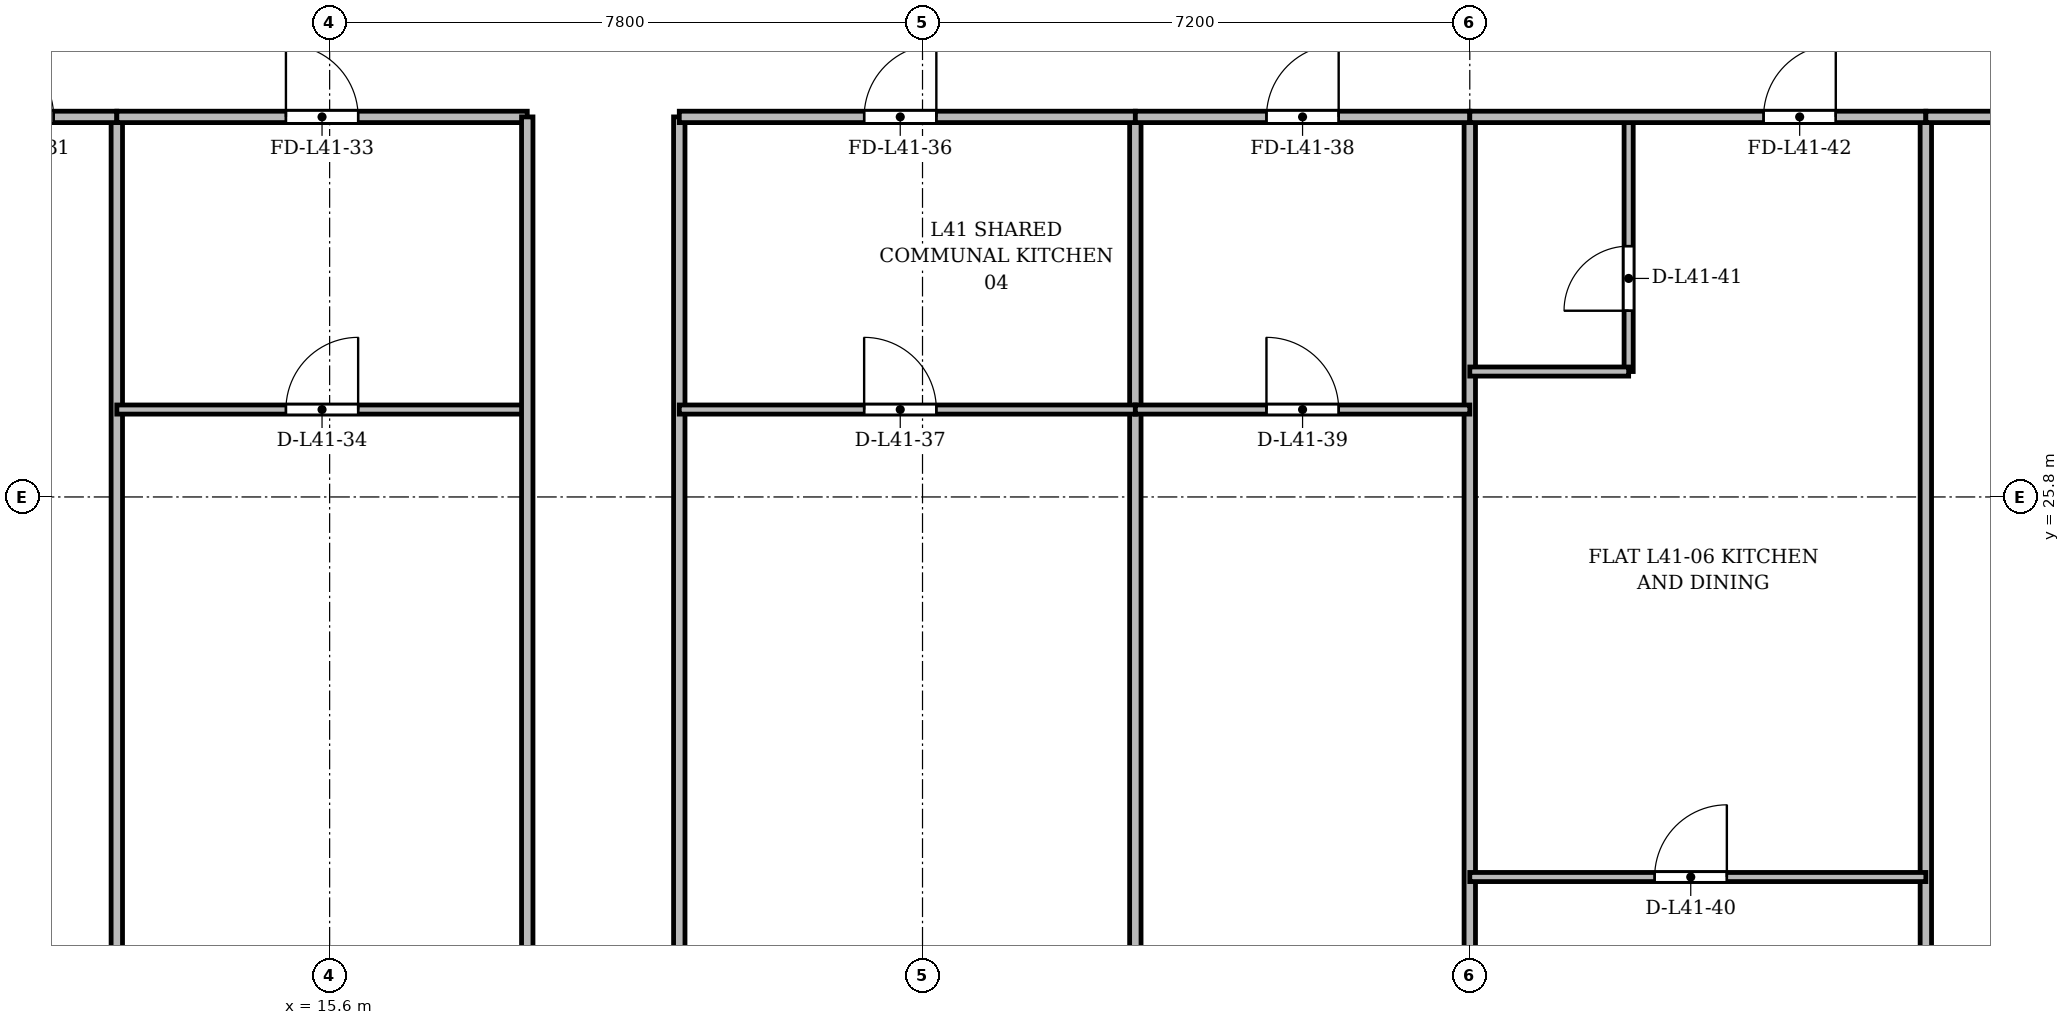
"""IFC4 building model, lengths in metres.
Left out: names, types, materials, properties, quantities, classifications, styles, units other than length and angle.
Written with IfcOpenShell. Run it as: python <this file> out.ifc"""

import sys

from ifc_helpers import new_model, si_unit, direction, frame, frame_2d, origin, place, context, subcontext, project, spatial, rectangle, extrude, source, transform, mapped, element, fill, save


model = new_model("IFC4")
c1 = context("Model", 3, precision=1e-05, world=origin(), true_north=direction((0.0, 1.0)))
c2 = subcontext(c1, "Body", "Model", "MODEL_VIEW")
j1 = project(units=[si_unit("LENGTHUNIT", "METRE"), si_unit("PLANEANGLEUNIT", "RADIAN")], contexts=[c1])
p1 = place(None, origin())
s1 = spatial("IfcSite", under=j1, at=p1, CompositionType="ELEMENT")
p2 = place(p1, origin())
s2 = spatial("IfcBuilding", under=s1, at=p2, CompositionType="ELEMENT")
p3 = place(p2, frame((0.0, 0.0, 157.3)))
s3 = spatial("IfcBuildingStorey", under=s2, at=p3, CompositionType="ELEMENT", Elevation=157.3)
for number, where, z_axis, x_axis in (
    (1, (12.8, 3.525, 0.0), (0.0, 0.0, 1.0), (0.0, 1.0, 0.0)),
    (2, (26.2, 3.525, 0.0), (0.0, 0.0, 1.0), (0.0, 1.0, 0.0)),
):
    element("IfcWall", number, at=place(p3, frame(where, z_axis=z_axis, x_axis=x_axis)), inside=s3, PredefinedType="PARTITIONING", context=c2, shape_type="SweptSolid", body=[
        extrude(rectangle(XDim=27.275, YDim=0.15, at=frame_2d((13.638, 0.0))), origin(), (0.0, 0.0, 1.0), 2.75),
    ])
p4 = place(p3, frame((30.6, 3.525, 0.0), z_axis=(0.0, 0.0, 1.0), x_axis=(0.0, 1.0, 0.0)))
e3 = element("IfcWall", 3, at=p4, inside=s3, PredefinedType="PARTITIONING", context=c2, shape_type="SweptSolid", body=[
    extrude(rectangle(XDim=27.275, YDim=0.15, at=frame_2d((13.638, 0.0))), origin(), (0.0, 0.0, 1.0), 2.85),
])
p5 = place(p3, frame((36.6, 3.525, 0.0), z_axis=(0.0, 0.0, 1.0), x_axis=(0.0, 1.0, 0.0)))
e4 = element("IfcWall", 4, at=p5, inside=s3, PredefinedType="PARTITIONING", context=c2, shape_type="SweptSolid", body=[
    extrude(rectangle(XDim=27.275, YDim=0.15, at=frame_2d((13.638, 0.0))), origin(), (0.0, 0.0, 1.0), 2.75),
])
p6 = place(p3, frame((8.025, 30.8, 0.0), z_axis=(0.0, 0.0, 1.0), x_axis=(1.0, 0.0, 0.0)))
e5 = element("IfcWall", 5, at=p6, inside=s3, PredefinedType="PARTITIONING", context=c2, shape_type="SweptSolid", body=[
    extrude(rectangle(XDim=4.775, YDim=0.15, at=frame_2d((2.388, 0.0))), origin(), (0.0, 0.0, 1.0), 2.85),
])
p7 = place(p6, frame((2.994, 0.0, 0.0)))
e6 = element("IfcOpeningElement", 6, at=p7, cuts=e5, PredefinedType="OPENING", context=c2, shape_type="SweptSolid", body=[
    extrude(rectangle(XDim=0.95, YDim=2.15, at=frame_2d((0.475, 1.075))), frame((0.0, 0.085, 0.0), z_axis=(0.0, -1.0, 0.0), x_axis=(1.0, 0.0, 0.0)), (0.0, 0.0, 1.0), 0.17),
])
p8 = place(p3, frame((12.8, 30.8, 0.0), z_axis=(0.0, 0.0, 1.0), x_axis=(1.0, 0.0, 0.0)))
e7 = element("IfcWall", 7, at=p8, inside=s3, PredefinedType="PARTITIONING", context=c2, shape_type="SweptSolid", body=[
    extrude(rectangle(XDim=5.4, YDim=0.15, at=frame_2d((2.7, 0.0))), origin(), (0.0, 0.0, 1.0), 2.85),
])
p9 = place(p8, frame((2.225, 0.0, 0.0)))
e8 = element("IfcOpeningElement", 8, at=p9, cuts=e7, PredefinedType="OPENING", context=c2, shape_type="SweptSolid", body=[
    extrude(rectangle(XDim=0.95, YDim=2.15, at=frame_2d((0.475, 1.075))), frame((0.0, 0.085, 0.0), z_axis=(0.0, -1.0, 0.0), x_axis=(1.0, 0.0, 0.0)), (0.0, 0.0, 1.0), 0.17),
])
p10 = place(p3, frame((12.8, 26.95, 0.0), z_axis=(0.0, 0.0, 1.0), x_axis=(1.0, 0.0, 0.0)))
e9 = element("IfcWall", 9, at=p10, inside=s3, PredefinedType="PARTITIONING", context=c2, shape_type="SweptSolid", body=[
    extrude(rectangle(XDim=5.4, YDim=0.12, at=frame_2d((2.7, 0.0))), origin(), (0.0, 0.0, 1.0), 2.85),
])
p11 = place(p10, frame((2.225, 0.0, 0.0)))
e10 = element("IfcOpeningElement", 10, at=p11, cuts=e9, PredefinedType="OPENING", context=c2, shape_type="SweptSolid", body=[
    extrude(rectangle(XDim=0.95, YDim=2.15, at=frame_2d((0.475, 1.075))), frame((0.0, 0.07, 0.0), z_axis=(0.0, -1.0, 0.0), x_axis=(1.0, 0.0, 0.0)), (0.0, 0.0, 1.0), 0.14),
])
for number, where, z_axis, x_axis in (
    (11, (18.2, 3.525, 0.0), (0.0, 0.0, 1.0), (0.0, 1.0, 0.0)),
    (12, (20.2, 3.525, 0.0), (0.0, 0.0, 1.0), (0.0, 1.0, 0.0)),
):
    element("IfcWall", number, at=place(p3, frame(where, z_axis=z_axis, x_axis=x_axis)), inside=s3, PredefinedType="PARTITIONING", context=c2, shape_type="SweptSolid", body=[
        extrude(rectangle(XDim=27.275, YDim=0.15, at=frame_2d((13.638, 0.0))), origin(), (0.0, 0.0, 1.0), 2.75),
    ])
p12 = place(p3, frame((20.2, 30.8, 0.0), z_axis=(0.0, 0.0, 1.0), x_axis=(1.0, 0.0, 0.0)))
e13 = element("IfcWall", 13, at=p12, inside=s3, PredefinedType="PARTITIONING", context=c2, shape_type="SweptSolid", body=[
    extrude(rectangle(XDim=6.0, YDim=0.15, at=frame_2d((3.0, 0.0))), origin(), (0.0, 0.0, 1.0), 2.85),
])
p13 = place(p12, frame((2.432, 0.0, 0.0)))
e14 = element("IfcOpeningElement", 14, at=p13, cuts=e13, PredefinedType="OPENING", context=c2, shape_type="SweptSolid", body=[
    extrude(rectangle(XDim=0.95, YDim=2.15, at=frame_2d((0.475, 1.075))), frame((0.0, 0.085, 0.0), z_axis=(0.0, -1.0, 0.0), x_axis=(1.0, 0.0, 0.0)), (0.0, 0.0, 1.0), 0.17),
])
p14 = place(p3, frame((20.2, 26.95, 0.0), z_axis=(0.0, 0.0, 1.0), x_axis=(1.0, 0.0, 0.0)))
e15 = element("IfcWall", 15, at=p14, inside=s3, PredefinedType="PARTITIONING", context=c2, shape_type="SweptSolid", body=[
    extrude(rectangle(XDim=6.0, YDim=0.12, at=frame_2d((3.0, 0.0))), origin(), (0.0, 0.0, 1.0), 2.85),
])
p15 = place(p14, frame((2.432, 0.0, 0.0)))
e16 = element("IfcOpeningElement", 16, at=p15, cuts=e15, PredefinedType="OPENING", context=c2, shape_type="SweptSolid", body=[
    extrude(rectangle(XDim=0.95, YDim=2.15, at=frame_2d((0.475, 1.075))), frame((0.0, 0.07, 0.0), z_axis=(0.0, -1.0, 0.0), x_axis=(1.0, 0.0, 0.0)), (0.0, 0.0, 1.0), 0.14),
])
p16 = place(p3, frame((26.2, 30.8, 0.0), z_axis=(0.0, 0.0, 1.0), x_axis=(1.0, 0.0, 0.0)))
e17 = element("IfcWall", 17, at=p16, inside=s3, PredefinedType="PARTITIONING", context=c2, shape_type="SweptSolid", body=[
    extrude(rectangle(XDim=4.4, YDim=0.15, at=frame_2d((2.2, 0.0))), origin(), (0.0, 0.0, 1.0), 2.85),
])
p17 = place(p16, frame((1.725, 0.0, 0.0)))
e18 = element("IfcOpeningElement", 18, at=p17, cuts=e17, PredefinedType="OPENING", context=c2, shape_type="SweptSolid", body=[
    extrude(rectangle(XDim=0.95, YDim=2.15, at=frame_2d((0.475, 1.075))), frame((0.0, 0.085, 0.0), z_axis=(0.0, -1.0, 0.0), x_axis=(1.0, 0.0, 0.0)), (0.0, 0.0, 1.0), 0.17),
])
p18 = place(p3, frame((26.2, 26.95, 0.0), z_axis=(0.0, 0.0, 1.0), x_axis=(1.0, 0.0, 0.0)))
e19 = element("IfcWall", 19, at=p18, inside=s3, PredefinedType="PARTITIONING", context=c2, shape_type="SweptSolid", body=[
    extrude(rectangle(XDim=4.4, YDim=0.12, at=frame_2d((2.2, 0.0))), origin(), (0.0, 0.0, 1.0), 2.85),
])
p19 = place(p18, frame((1.725, 0.0, 0.0)))
e20 = element("IfcOpeningElement", 20, at=p19, cuts=e19, PredefinedType="OPENING", context=c2, shape_type="SweptSolid", body=[
    extrude(rectangle(XDim=0.95, YDim=2.15, at=frame_2d((0.475, 1.075))), frame((0.0, 0.07, 0.0), z_axis=(0.0, -1.0, 0.0), x_axis=(1.0, 0.0, 0.0)), (0.0, 0.0, 1.0), 0.14),
])
p20 = place(p3, frame((30.6, 20.8, 0.0), z_axis=(0.0, 0.0, 1.0), x_axis=(1.0, 0.0, 0.0)))
e21 = element("IfcWall", 21, at=p20, inside=s3, PredefinedType="PARTITIONING", context=c2, shape_type="SweptSolid", body=[
    extrude(rectangle(XDim=6.0, YDim=0.12, at=frame_2d((3.0, 0.0))), origin(), (0.0, 0.0, 1.0), 2.85),
])
p21 = place(p20, frame((2.432, 0.0, 0.0)))
e22 = element("IfcOpeningElement", 22, at=p21, cuts=e21, PredefinedType="OPENING", context=c2, shape_type="SweptSolid", body=[
    extrude(rectangle(XDim=0.95, YDim=2.15, at=frame_2d((0.475, 1.075))), frame((0.0, 0.07, 0.0), z_axis=(0.0, -1.0, 0.0), x_axis=(1.0, 0.0, 0.0)), (0.0, 0.0, 1.0), 0.14),
])
p22 = place(p3, frame((32.69, 27.45, 0.0), z_axis=(0.0, 0.0, 1.0), x_axis=(0.0, 1.0, 0.0)))
e23 = element("IfcWall", 23, at=p22, inside=s3, PredefinedType="PARTITIONING", context=c2, shape_type="SweptSolid", body=[
    extrude(rectangle(XDim=3.35, YDim=0.12, at=frame_2d((1.675, 0.0))), origin(), (0.0, 0.0, 1.0), 3.35),
])
p23 = place(p22, frame((0.8, 0.0, 0.0)))
e24 = element("IfcOpeningElement", 24, at=p23, cuts=e23, PredefinedType="OPENING", context=c2, shape_type="SweptSolid", body=[
    extrude(rectangle(XDim=0.85, YDim=2.1, at=frame_2d((0.425, 1.05))), frame((0.0, 0.07, 0.0), z_axis=(0.0, -1.0, 0.0), x_axis=(1.0, 0.0, 0.0)), (0.0, 0.0, 1.0), 0.14),
])
p24 = place(p3, frame((30.6, 27.45, 0.0), z_axis=(0.0, 0.0, 1.0), x_axis=(1.0, 0.0, 0.0)))
e25 = element("IfcWall", 25, at=p24, inside=s3, PredefinedType="PARTITIONING", context=c2, shape_type="SweptSolid", body=[
    extrude(rectangle(XDim=2.09, YDim=0.12, at=frame_2d((1.045, 0.0))), origin(), (0.0, 0.0, 1.0), 2.85),
])
p25 = place(p3, frame((30.6, 30.8, 0.0), z_axis=(0.0, 0.0, 1.0), x_axis=(1.0, 0.0, 0.0)))
e26 = element("IfcWall", 26, at=p25, inside=s3, PredefinedType="PARTITIONING", context=c2, shape_type="SweptSolid", body=[
    extrude(rectangle(XDim=6.0, YDim=0.15, at=frame_2d((3.0, 0.0))), origin(), (0.0, 0.0, 1.0), 2.85),
])
p26 = place(p25, frame((3.865, 0.0, 0.0)))
e27 = element("IfcOpeningElement", 27, at=p26, cuts=e26, PredefinedType="OPENING", context=c2, shape_type="SweptSolid", body=[
    extrude(rectangle(XDim=0.95, YDim=2.15, at=frame_2d((0.475, 1.075))), frame((0.0, 0.085, 0.0), z_axis=(0.0, -1.0, 0.0), x_axis=(1.0, 0.0, 0.0)), (0.0, 0.0, 1.0), 0.17),
])
p27 = place(p3, frame((36.6, 30.8, 0.0), z_axis=(0.0, 0.0, 1.0), x_axis=(1.0, 0.0, 0.0)))
e28 = element("IfcWall", 28, at=p27, inside=s3, PredefinedType="PARTITIONING", context=c2, shape_type="SweptSolid", body=[
    extrude(rectangle(XDim=7.2, YDim=0.15, at=frame_2d((3.6, 0.0))), origin(), (0.0, 0.0, 1.0), 2.85),
])
p28 = place(p27, frame((3.125, 0.0, 0.0)))
e29 = element("IfcOpeningElement", 29, at=p28, cuts=e28, PredefinedType="OPENING", context=c2, shape_type="SweptSolid", body=[
    extrude(rectangle(XDim=0.95, YDim=2.15, at=frame_2d((0.475, 1.075))), frame((0.0, 0.085, 0.0), z_axis=(0.0, -1.0, 0.0), x_axis=(1.0, 0.0, 0.0)), (0.0, 0.0, 1.0), 0.17),
])
m1 = source(origin(), c2, "Body", "SweptSolid", [
    extrude(rectangle(XDim=0.95, YDim=2.15, at=frame_2d((0.475, 1.075))), frame((0.0, 0.025, 0.0), z_axis=(0.0, -1.0, 0.0), x_axis=(1.0, 0.0, 0.0)), (0.0, 0.0, 1.0), 0.05),
])
p29 = place(p7, origin())
e30 = element("IfcDoor", 30, at=p29, inside=s3, OperationType="SINGLE_SWING_LEFT", PredefinedType="DOOR", context=c2, shape_type="MappedRepresentation", body=[
    mapped(m1, transform((0.0, 0.0, 0.0), x_axis=(1.0, 0.0, 0.0), y_axis=(0.0, 1.0, 0.0), z_axis=(0.0, 0.0, 1.0), scale=1.0)),
])
fill(e6, e30)
p30 = place(p9, origin())
e31 = element("IfcDoor", 31, at=p30, inside=s3, OperationType="SINGLE_SWING_LEFT", PredefinedType="DOOR", context=c2, shape_type="MappedRepresentation", body=[
    mapped(m1, transform((0.0, 0.0, 0.0), x_axis=(1.0, 0.0, 0.0), y_axis=(0.0, 1.0, 0.0), z_axis=(0.0, 0.0, 1.0), scale=1.0)),
])
fill(e8, e31)
p31 = place(p11, origin())
e32 = element("IfcDoor", 32, at=p31, inside=s3, OperationType="SINGLE_SWING_RIGHT", PredefinedType="DOOR", context=c2, shape_type="MappedRepresentation", body=[
    mapped(m1, transform((0.0, 0.0, 0.0), x_axis=(1.0, 0.0, 0.0), y_axis=(0.0, 1.0, 0.0), z_axis=(0.0, 0.0, 1.0), scale=1.0)),
])
fill(e10, e32)
p32 = place(p13, origin())
e33 = element("IfcDoor", 33, at=p32, inside=s3, OperationType="SINGLE_SWING_RIGHT", PredefinedType="DOOR", context=c2, shape_type="MappedRepresentation", body=[
    mapped(m1, transform((0.0, 0.0, 0.0), x_axis=(1.0, 0.0, 0.0), y_axis=(0.0, 1.0, 0.0), z_axis=(0.0, 0.0, 1.0), scale=1.0)),
])
fill(e14, e33)
p33 = place(p15, origin())
e34 = element("IfcDoor", 34, at=p33, inside=s3, OperationType="SINGLE_SWING_LEFT", PredefinedType="DOOR", context=c2, shape_type="MappedRepresentation", body=[
    mapped(m1, transform((0.0, 0.0, 0.0), x_axis=(1.0, 0.0, 0.0), y_axis=(0.0, 1.0, 0.0), z_axis=(0.0, 0.0, 1.0), scale=1.0)),
])
fill(e16, e34)
p34 = place(p17, origin())
e35 = element("IfcDoor", 35, at=p34, inside=s3, OperationType="SINGLE_SWING_RIGHT", PredefinedType="DOOR", context=c2, shape_type="MappedRepresentation", body=[
    mapped(m1, transform((0.0, 0.0, 0.0), x_axis=(1.0, 0.0, 0.0), y_axis=(0.0, 1.0, 0.0), z_axis=(0.0, 0.0, 1.0), scale=1.0)),
])
fill(e18, e35)
p35 = place(p19, origin())
e36 = element("IfcDoor", 36, at=p35, inside=s3, OperationType="SINGLE_SWING_LEFT", PredefinedType="DOOR", context=c2, shape_type="MappedRepresentation", body=[
    mapped(m1, transform((0.0, 0.0, 0.0), x_axis=(1.0, 0.0, 0.0), y_axis=(0.0, 1.0, 0.0), z_axis=(0.0, 0.0, 1.0), scale=1.0)),
])
fill(e20, e36)
p36 = place(p21, origin())
e37 = element("IfcDoor", 37, at=p36, inside=s3, OperationType="SINGLE_SWING_RIGHT", PredefinedType="DOOR", context=c2, shape_type="MappedRepresentation", body=[
    mapped(m1, transform((0.0, 0.0, 0.0), x_axis=(1.0, 0.0, 0.0), y_axis=(0.0, 1.0, 0.0), z_axis=(0.0, 0.0, 1.0), scale=1.0)),
])
fill(e22, e37)
m2 = source(origin(), c2, "Body", "SweptSolid", [
    extrude(rectangle(XDim=0.85, YDim=2.1, at=frame_2d((0.425, 1.05))), frame((0.0, 0.025, 0.0), z_axis=(0.0, -1.0, 0.0), x_axis=(1.0, 0.0, 0.0)), (0.0, 0.0, 1.0), 0.05),
])
p37 = place(p23, origin())
e38 = element("IfcDoor", 38, at=p37, inside=s3, OperationType="SINGLE_SWING_LEFT", PredefinedType="DOOR", context=c2, shape_type="MappedRepresentation", body=[
    mapped(m2, transform((0.0, 0.0, 0.0), x_axis=(1.0, 0.0, 0.0), y_axis=(0.0, 1.0, 0.0), z_axis=(0.0, 0.0, 1.0), scale=1.0)),
])
fill(e24, e38)
p38 = place(p26, origin())
e39 = element("IfcDoor", 39, at=p38, inside=s3, OperationType="SINGLE_SWING_RIGHT", PredefinedType="DOOR", context=c2, shape_type="MappedRepresentation", body=[
    mapped(m1, transform((0.0, 0.0, 0.0), x_axis=(1.0, 0.0, 0.0), y_axis=(0.0, 1.0, 0.0), z_axis=(0.0, 0.0, 1.0), scale=1.0)),
])
fill(e27, e39)
save(model, sys.argv[1])
